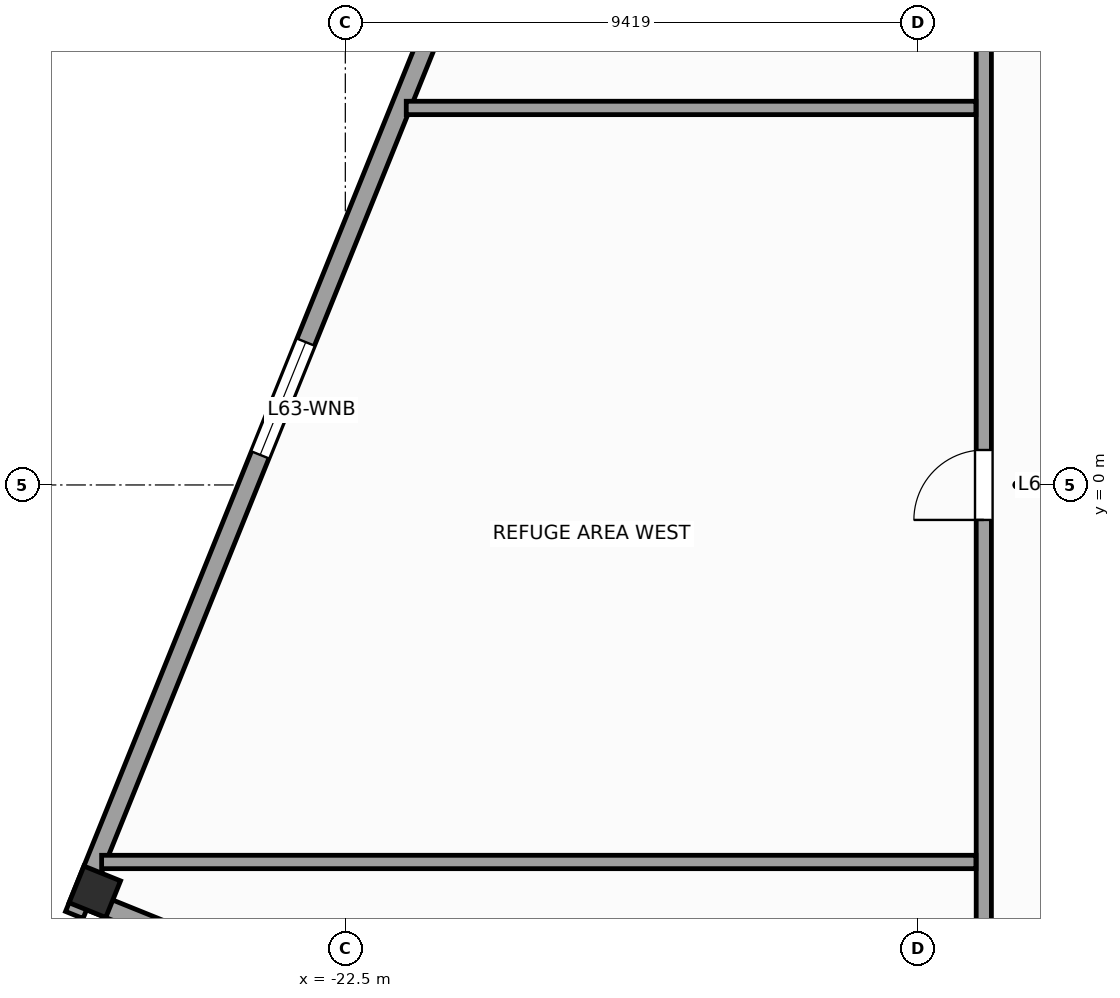
"""IFC4 building model, lengths in metres.
Left out: names, types, materials, properties, quantities, classifications, styles, units other than length and angle.
Written with IfcOpenShell. Run it as: python <this file> out.ifc"""

import sys

from ifc_helpers import new_model, si_unit, direction, frame, frame_2d, origin, origin_2d, place, context, subcontext, project, spatial, rectangle, extrude, source, transform, mapped, element, fill, save


model = new_model("IFC4")
c1 = context("Model", 3, precision=1e-05, world=origin(), true_north=direction((0.0, 1.0)))
c2 = subcontext(c1, "Body", "Model", "MODEL_VIEW")
j1 = project(units=[si_unit("LENGTHUNIT", "METRE"), si_unit("PLANEANGLEUNIT", "RADIAN")], contexts=[c1])
p1 = place(None, origin())
s1 = spatial("IfcSite", under=j1, at=p1, CompositionType="ELEMENT")
p2 = place(p1, origin())
s2 = spatial("IfcBuilding", under=s1, at=p2, CompositionType="ELEMENT")
p3 = place(p2, frame((0.0, 0.0, 260.2)))
s3 = spatial("IfcBuildingStorey", under=s2, at=p3, CompositionType="ELEMENT", Elevation=260.2)
m1 = source(origin(), c2, "Body", "SweptSolid", [
    extrude(rectangle(XDim=0.65, YDim=0.65, at=origin_2d()), origin(), (0.0, 0.0, 1.0), 5.0),
])
p4 = place(p3, frame((-26.62, -6.69, 0.0), z_axis=(0.0, 0.0, 1.0), x_axis=(0.374606593416, 0.927183854567, 0.0)))
e1 = element("IfcColumn", 1, at=p4, inside=s3, PredefinedType="COLUMN", context=c2, shape_type="MappedRepresentation", body=[
    mapped(m1, transform((0.0, 0.0, 0.0), scale=1.0)),
])
p5 = place(p3, frame((-26.841, -6.784, 0.0), z_axis=(0.0, 0.0, 1.0), x_axis=(0.927171722085, -0.374636620962, 0.0)))
e2 = element("IfcWall", 2, at=p5, inside=s3, PredefinedType="STANDARD", context=c2, shape_type="SweptSolid", body=[
    extrude(rectangle(XDim=6.0, YDim=0.31, at=frame_2d((3.0, 0.0))), origin(), (0.0, 0.0, 1.0), 4.05),
])
p6 = place(p3, frame((-20.718, 8.371, 0.0), z_axis=(0.0, 0.0, 1.0), x_axis=(-0.374600710538, -0.927186231382, 0.0)))
e3 = element("IfcWall", 3, at=p6, inside=s3, PredefinedType="STANDARD", context=c2, shape_type="SweptSolid", body=[
    extrude(rectangle(XDim=16.655, YDim=0.31, at=frame_2d((8.328, 0.0))), origin(), (0.0, 0.0, 1.0), 4.15),
])
p7 = place(p6, frame((6.495, 0.0, 0.65)))
e4 = element("IfcOpeningElement", 4, at=p7, cuts=e3, PredefinedType="OPENING", context=c2, shape_type="SweptSolid", body=[
    extrude(rectangle(XDim=2.0, YDim=1.45, at=frame_2d((1.0, 0.725))), frame((0.0, 0.165, 0.0), z_axis=(0.0, -1.0, 0.0), x_axis=(1.0, 0.0, 0.0)), (0.0, 0.0, 1.0), 0.33),
])
p8 = place(p3, frame((-12.0, -11.9, 0.0), z_axis=(0.0, 0.0, 1.0), x_axis=(0.0, 1.0, 0.0)))
e5 = element("IfcWall", 5, at=p8, inside=s3, PredefinedType="PARTITIONING", context=c2, shape_type="SweptSolid", body=[
    extrude(rectangle(XDim=23.8, YDim=0.25, at=frame_2d((11.9, 0.0))), origin(), (0.0, 0.0, 1.0), 4.75),
])
p9 = place(p8, frame((11.325, 0.0, 0.0)))
e6 = element("IfcOpeningElement", 6, at=p9, cuts=e5, PredefinedType="OPENING", context=c2, shape_type="SweptSolid", body=[
    extrude(rectangle(XDim=1.15, YDim=2.25, at=frame_2d((0.575, 1.125))), frame((0.0, 0.135, 0.0), z_axis=(0.0, -1.0, 0.0), x_axis=(1.0, 0.0, 0.0)), (0.0, 0.0, 1.0), 0.27),
])
p10 = place(p3, frame((-12.13, -6.2, 0.0), z_axis=(0.0, 0.0, 1.0), x_axis=(-1.0, 0.0, 0.0)))
e7 = element("IfcWall", 7, at=p10, inside=s3, PredefinedType="PARTITIONING", context=c2, shape_type="SweptSolid", body=[
    extrude(rectangle(XDim=14.378, YDim=0.22, at=frame_2d((7.189, 0.0))), origin(), (0.0, 0.0, 1.0), 4.75),
])
p11 = place(p3, frame((-12.13, 6.2, 0.0), z_axis=(0.0, 0.0, 1.0), x_axis=(-1.0, 0.0, 0.0)))
e8 = element("IfcWall", 8, at=p11, inside=s3, PredefinedType="PARTITIONING", context=c2, shape_type="SweptSolid", body=[
    extrude(rectangle(XDim=9.368, YDim=0.22, at=frame_2d((4.684, 0.0))), origin(), (0.0, 0.0, 1.0), 4.75),
])
m2 = source(origin(), c2, "Body", "SweptSolid", [
    extrude(rectangle(XDim=2.0, YDim=1.45, at=frame_2d((1.0, 0.725))), frame((0.0, 0.03, 0.0), z_axis=(0.0, -1.0, 0.0), x_axis=(1.0, 0.0, 0.0)), (0.0, 0.0, 1.0), 0.06),
])
p12 = place(p7, origin())
e9 = element("IfcWindow", 9, at=p12, inside=s3, PartitioningType="SINGLE_PANEL", PredefinedType="WINDOW", context=c2, shape_type="MappedRepresentation", body=[
    mapped(m2, transform((0.0, 0.0, 0.0), scale=1.0)),
])
fill(e4, e9)
m3 = source(origin(), c2, "Body", "SweptSolid", [
    extrude(rectangle(XDim=1.15, YDim=2.25, at=frame_2d((0.575, 1.125))), frame((0.0, 0.025, 0.0), z_axis=(0.0, -1.0, 0.0), x_axis=(1.0, 0.0, 0.0)), (0.0, 0.0, 1.0), 0.05),
])
p13 = place(p9, origin())
e10 = element("IfcDoor", 10, at=p13, inside=s3, OperationType="SINGLE_SWING_LEFT", PredefinedType="DOOR", context=c2, shape_type="MappedRepresentation", body=[
    mapped(m3, transform((0.0, 0.0, 0.0), scale=1.0)),
])
fill(e6, e10)
save(model, sys.argv[1])
